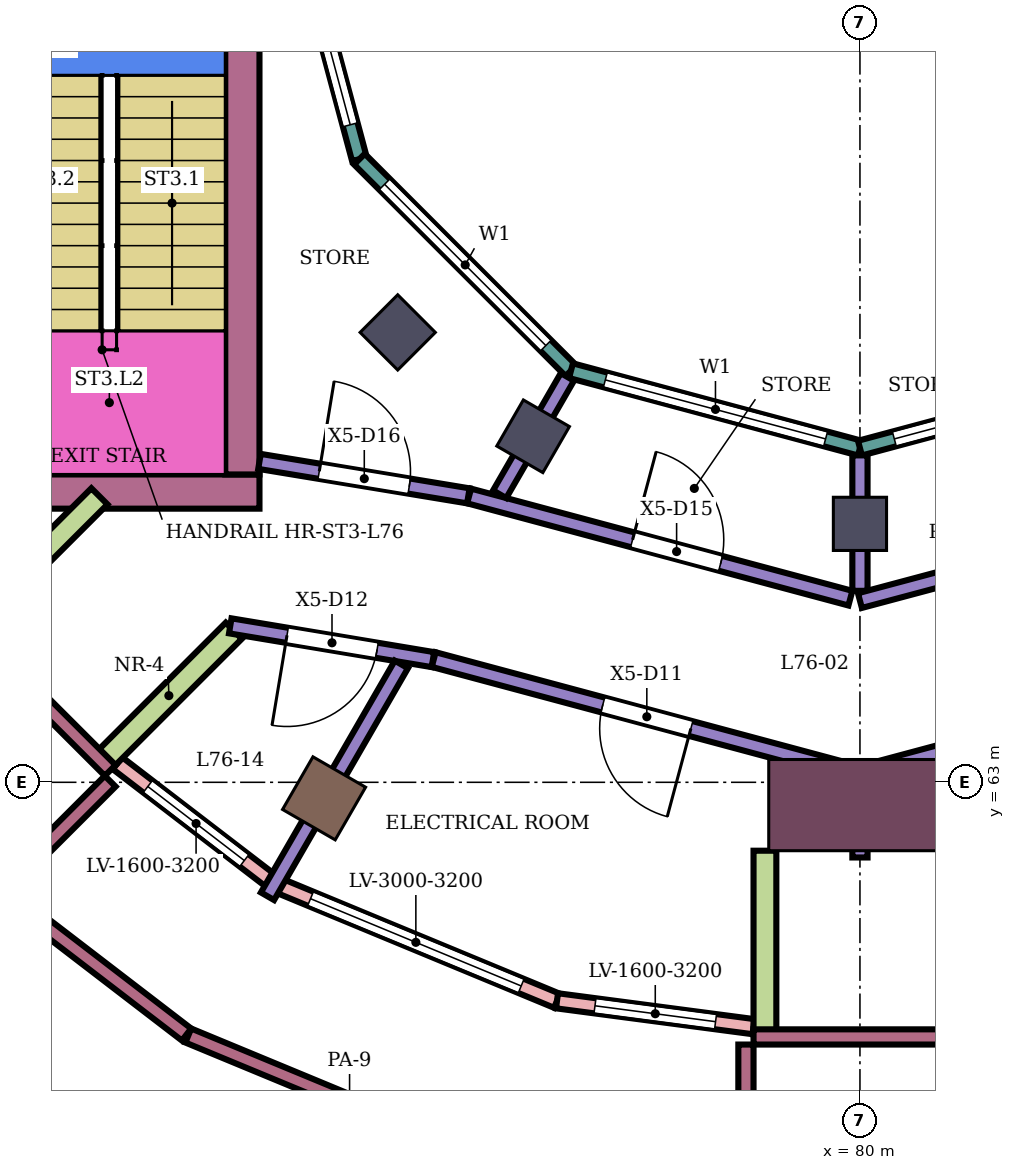
"""IFC4 building model, lengths in metres.
Left out: names, types, materials, properties, quantities, classifications, styles, units other than length and angle.
Written with IfcOpenShell. Run it as: python <this file> out.ifc"""

import sys

from ifc_helpers import new_model, si_unit, direction, frame, frame_2d, origin, origin_2d, place, context, subcontext, project, spatial, rectangle, extrude, element, fill, save


model = new_model("IFC4")
c1 = context("Model", 3, precision=1e-05, world=origin(), true_north=direction((0.0, 1.0)))
c2 = subcontext(c1, "Body", "Model", "MODEL_VIEW")
j1 = project(units=[si_unit("LENGTHUNIT", "METRE"), si_unit("PLANEANGLEUNIT", "RADIAN")], contexts=[c1])
p1 = place(None, origin())
s1 = spatial("IfcSite", under=j1, at=p1, CompositionType="ELEMENT")
p2 = place(p1, origin())
s2 = spatial("IfcBuilding", under=s1, at=p2, CompositionType="ELEMENT")
p3 = place(p2, frame((0.0, 0.0, 333.1)))
s3 = spatial("IfcBuildingStorey", under=s2, at=p3, CompositionType="ELEMENT", Elevation=333.1)
p4 = place(p3, frame((72.95, 62.789, 0.0), z_axis=(0.0, 0.0, 1.0), x_axis=(-0.5, -0.866025403784, 0.0)))
e1 = element("IfcColumn", 1, at=p4, inside=s3, PredefinedType="COLUMN", context=c2, shape_type="SweptSolid", body=[
    extrude(rectangle(XDim=0.8, YDim=0.8, at=origin_2d()), origin(), (0.0, 0.0, 1.0), 4.5),
])
for number, where, z_axis, x_axis in (
    (2, (73.919, 68.919, 0.0), (0.0, 0.0, 1.0), (-0.707, -0.707, 0.0)),
    (3, (75.7, 67.552, 0.0), (0.0, 0.0, 1.0), (-0.5, -0.866, 0.0)),
    (4, (80.0, 66.4, 0.0), (0.0, 0.0, 1.0), (0.0, -1.0, 0.0)),
):
    element("IfcColumn", number, at=place(p3, frame(where, z_axis=z_axis, x_axis=x_axis)), inside=s3, PredefinedType="COLUMN", context=c2, shape_type="SweptSolid", body=[
        extrude(rectangle(XDim=0.7, YDim=0.7, at=origin_2d()), origin(), (0.0, 0.0, 1.0), 4.5),
    ])
p5 = place(p3, frame((80.0, 62.7, 0.0), z_axis=(0.0, 0.0, 1.0), x_axis=(0.0, -1.0, 0.0)))
e5 = element("IfcColumn", 5, at=p5, inside=s3, PredefinedType="COLUMN", context=c2, shape_type="SweptSolid", body=[
    extrude(rectangle(XDim=1.2, YDim=2.4, at=origin_2d()), origin(), (0.0, 0.0, 1.0), 4.5),
])
p6 = place(p3, frame((72.1, 66.825, 0.0), z_axis=(0.0, 0.0, 1.0), x_axis=(-1.0, 0.0, 0.0)))
e6 = element("IfcWall", 6, at=p6, inside=s3, PredefinedType="SHEAR", context=c2, shape_type="SweptSolid", body=[
    extrude(rectangle(XDim=3.8, YDim=0.45, at=frame_2d((1.9, 0.0))), origin(), (0.0, 0.0, 1.0), 4.15),
])
p7 = place(p3, frame((71.875, 75.0, 0.0), z_axis=(0.0, 0.0, 1.0), x_axis=(0.0, -1.0, 0.0)))
e7 = element("IfcWall", 7, at=p7, inside=s3, PredefinedType="SHEAR", context=c2, shape_type="SweptSolid", body=[
    extrude(rectangle(XDim=7.95, YDim=0.45, at=frame_2d((3.975, 0.0))), origin(), (0.0, 0.0, 1.0), 4.15),
])
p8 = place(p3, frame((70.231, 63.251, 0.0), z_axis=(0.0, 0.0, 1.0), x_axis=(0.793402901715, -0.608696833859, 0.0)))
e8 = element("IfcWall", 8, at=p8, inside=s3, PredefinedType="NOTDEFINED", context=c2, shape_type="SweptSolid", body=[
    extrude(rectangle(XDim=2.608, YDim=0.2, at=frame_2d((1.304, 0.0))), origin(), (0.0, 0.0, 1.0), 4.5),
])
p9 = place(p8, frame((0.504, 0.0, 0.5)))
e9 = element("IfcOpeningElement", 9, at=p9, cuts=e8, PredefinedType="OPENING", context=c2, shape_type="SweptSolid", body=[
    extrude(rectangle(XDim=1.6, YDim=3.2, at=frame_2d((0.8, 1.6))), frame((0.0, 0.11, 0.0), z_axis=(0.0, -1.0, 0.0), x_axis=(1.0, 0.0, 0.0)), (0.0, 0.0, 1.0), 0.22),
])
p10 = place(p3, frame((72.301, 61.664, 0.0), z_axis=(0.0, 0.0, 1.0), x_axis=(0.923858417842, -0.38273440371, 0.0)))
e10 = element("IfcWall", 10, at=p10, inside=s3, PredefinedType="NOTDEFINED", context=c2, shape_type="SweptSolid", body=[
    extrude(rectangle(XDim=4.02, YDim=0.2, at=frame_2d((2.01, 0.0))), origin(), (0.0, 0.0, 1.0), 4.5),
])
p11 = place(p10, frame((0.51, 0.0, 0.5)))
e11 = element("IfcOpeningElement", 11, at=p11, cuts=e10, PredefinedType="OPENING", context=c2, shape_type="SweptSolid", body=[
    extrude(rectangle(XDim=3.0, YDim=3.2, at=frame_2d((1.5, 1.6))), frame((0.0, 0.11, 0.0), z_axis=(0.0, -1.0, 0.0), x_axis=(1.0, 0.0, 0.0)), (0.0, 0.0, 1.0), 0.22),
])
p12 = place(p3, frame((76.014, 60.125, 0.0), z_axis=(0.0, 0.0, 1.0), x_axis=(0.991448878041, -0.130495678972, 0.0)))
e12 = element("IfcWall", 12, at=p12, inside=s3, PredefinedType="NOTDEFINED", context=c2, shape_type="SweptSolid", body=[
    extrude(rectangle(XDim=2.608, YDim=0.2, at=frame_2d((1.304, 0.0))), origin(), (0.0, 0.0, 1.0), 4.5),
])
p13 = place(p12, frame((0.504, 0.0, 0.5)))
e13 = element("IfcOpeningElement", 13, at=p13, cuts=e12, PredefinedType="OPENING", context=c2, shape_type="SweptSolid", body=[
    extrude(rectangle(XDim=1.6, YDim=3.2, at=frame_2d((0.8, 1.6))), frame((0.0, 0.11, 0.0), z_axis=(0.0, -1.0, 0.0), x_axis=(1.0, 0.0, 0.0)), (0.0, 0.0, 1.0), 0.22),
])
for number, where, z_axis, x_axis in (
    (14, (69.994, 66.762, 0.0), (0.0, 0.0, 1.0), (-0.707, -0.707, 0.0)),
    (15, (71.762, 64.994, 0.0), (0.0, 0.0, 1.0), (-0.707, -0.707, 0.0)),
    (16, (78.75, 62.1, 0.0), (0.0, 0.0, 1.0), (0.0, -1.0, 0.0)),
):
    element("IfcWall", number, at=place(p3, frame(where, z_axis=z_axis, x_axis=x_axis)), inside=s3, PredefinedType="NOTDEFINED", context=c2, shape_type="SweptSolid", body=[
        extrude(rectangle(XDim=2.416, YDim=0.3, at=frame_2d((1.208, 0.0))), origin(), (0.0, 0.0, 1.0), 4.5),
    ])
p14 = place(p3, frame((72.396, 75.0, 0.0), z_axis=(0.0, 0.0, 1.0), x_axis=(0.258789828301, -0.965933654434, 0.0)))
e17 = element("IfcWall", 17, at=p14, inside=s3, PredefinedType="NOTDEFINED", context=c2, shape_type="SweptSolid", body=[
    extrude(rectangle(XDim=3.936, YDim=0.2, at=frame_2d((1.968, 0.0))), origin(), (0.0, 0.0, 1.0), 4.5),
])
p15 = place(p14, frame((0.468, 0.0, 0.9)))
e18 = element("IfcOpeningElement", 18, at=p15, cuts=e17, PredefinedType="OPENING", context=c2, shape_type="SweptSolid", body=[
    extrude(rectangle(XDim=3.0, YDim=2.3, at=frame_2d((1.5, 1.15))), frame((0.0, 0.11, 0.0), z_axis=(0.0, -1.0, 0.0), x_axis=(1.0, 0.0, 0.0)), (0.0, 0.0, 1.0), 0.22),
])
p16 = place(p3, frame((73.415, 71.198, 0.0), z_axis=(0.0, 0.0, 1.0), x_axis=(0.707106781187, -0.707106781187, 0.0)))
e19 = element("IfcWall", 19, at=p16, inside=s3, PredefinedType="NOTDEFINED", context=c2, shape_type="SweptSolid", body=[
    extrude(rectangle(XDim=3.936, YDim=0.2, at=frame_2d((1.968, 0.0))), origin(), (0.0, 0.0, 1.0), 4.5),
])
p17 = place(p16, frame((0.468, 0.0, 0.9)))
e20 = element("IfcOpeningElement", 20, at=p17, cuts=e19, PredefinedType="OPENING", context=c2, shape_type="SweptSolid", body=[
    extrude(rectangle(XDim=3.0, YDim=2.3, at=frame_2d((1.5, 1.15))), frame((0.0, 0.11, 0.0), z_axis=(0.0, -1.0, 0.0), x_axis=(1.0, 0.0, 0.0)), (0.0, 0.0, 1.0), 0.22),
])
p18 = place(p3, frame((76.198, 68.415, 0.0), z_axis=(0.0, 0.0, 1.0), x_axis=(0.965933654434, -0.258789828301, 0.0)))
e21 = element("IfcWall", 21, at=p18, inside=s3, PredefinedType="NOTDEFINED", context=c2, shape_type="SweptSolid", body=[
    extrude(rectangle(XDim=3.936, YDim=0.2, at=frame_2d((1.968, 0.0))), origin(), (0.0, 0.0, 1.0), 4.5),
])
p19 = place(p18, frame((0.468, 0.0, 0.9)))
e22 = element("IfcOpeningElement", 22, at=p19, cuts=e21, PredefinedType="OPENING", context=c2, shape_type="SweptSolid", body=[
    extrude(rectangle(XDim=3.0, YDim=2.3, at=frame_2d((1.5, 1.15))), frame((0.0, 0.11, 0.0), z_axis=(0.0, -1.0, 0.0), x_axis=(1.0, 0.0, 0.0)), (0.0, 0.0, 1.0), 0.22),
])
p20 = place(p3, frame((80.0, 67.396, 0.0), z_axis=(0.0, 0.0, 1.0), x_axis=(0.965933654434, 0.258789828301, 0.0)))
e23 = element("IfcWall", 23, at=p20, inside=s3, PredefinedType="NOTDEFINED", context=c2, shape_type="SweptSolid", body=[
    extrude(rectangle(XDim=3.936, YDim=0.2, at=frame_2d((1.968, 0.0))), origin(), (0.0, 0.0, 1.0), 4.5),
])
p21 = place(p20, frame((0.468, 0.0, 0.9)))
e24 = element("IfcOpeningElement", 24, at=p21, cuts=e23, PredefinedType="OPENING", context=c2, shape_type="SweptSolid", body=[
    extrude(rectangle(XDim=3.0, YDim=2.3, at=frame_2d((1.5, 1.15))), frame((0.0, 0.11, 0.0), z_axis=(0.0, -1.0, 0.0), x_axis=(1.0, 0.0, 0.0)), (0.0, 0.0, 1.0), 0.22),
])
p22 = place(p3, frame((81.4, 59.65, 0.0), z_axis=(0.0, 0.0, 1.0), x_axis=(-1.0, 0.0, 0.0)))
e25 = element("IfcWall", 25, at=p22, inside=s3, PredefinedType="PARAPET", context=c2, shape_type="SweptSolid", body=[
    extrude(rectangle(XDim=2.8, YDim=0.2, at=frame_2d((1.4, 0.0))), origin(), (0.0, 0.0, 1.0), 1.1),
])
p23 = place(p3, frame((78.5, 59.55, 0.0), z_axis=(0.0, 0.0, 1.0), x_axis=(0.0, -1.0, 0.0)))
e26 = element("IfcWall", 26, at=p23, inside=s3, PredefinedType="PARAPET", context=c2, shape_type="SweptSolid", body=[
    extrude(rectangle(XDim=1.936, YDim=0.2, at=frame_2d((0.968, 0.0))), origin(), (0.0, 0.0, 1.0), 1.1),
])
p24 = place(p3, frame((75.407, 57.911, 0.0), z_axis=(0.0, 0.0, 1.0), x_axis=(-0.923884687805, 0.382670986147, 0.0)))
e27 = element("IfcWall", 27, at=p24, inside=s3, PredefinedType="PARAPET", context=c2, shape_type="SweptSolid", body=[
    extrude(rectangle(XDim=4.594, YDim=0.2, at=frame_2d((2.297, 0.0))), origin(), (0.0, 0.0, 1.0), 1.1),
])
p25 = place(p3, frame((71.141, 59.682, 0.0), z_axis=(0.0, 0.0, 1.0), x_axis=(-0.79335441758, 0.608760025056, 0.0)))
e28 = element("IfcWall", 28, at=p25, inside=s3, PredefinedType="PARAPET", context=c2, shape_type="SweptSolid", body=[
    extrude(rectangle(XDim=2.98, YDim=0.2, at=frame_2d((1.49, 0.0))), origin(), (0.0, 0.0, 1.0), 1.1),
])
p26 = place(p3, frame((68.767, 61.646, 0.0), z_axis=(0.0, 0.0, 1.0), x_axis=(0.707043717037, 0.707169839712, 0.0)))
e29 = element("IfcWall", 29, at=p26, inside=s3, PredefinedType="PARAPET", context=c2, shape_type="SweptSolid", body=[
    extrude(rectangle(XDim=1.936, YDim=0.2, at=frame_2d((0.968, 0.0))), origin(), (0.0, 0.0, 1.0), 1.1),
])
p27 = place(p3, frame((70.136, 63.156, 0.0), z_axis=(0.0, 0.0, 1.0), x_axis=(-0.707106781187, 0.707106781187, 0.0)))
e30 = element("IfcWall", 30, at=p27, inside=s3, PredefinedType="PARAPET", context=c2, shape_type="SweptSolid", body=[
    extrude(rectangle(XDim=2.8, YDim=0.2, at=frame_2d((1.4, 0.0))), origin(), (0.0, 0.0, 1.0), 1.1),
])
p28 = place(p3, frame((71.716, 65.058, 0.0), z_axis=(0.0, 0.0, 1.0), x_axis=(0.986393923832, -0.164398987305, 0.0)))
e31 = element("IfcWall", 31, at=p28, inside=s3, PredefinedType="PARTITIONING", context=c2, shape_type="SweptSolid", body=[
    extrude(rectangle(XDim=2.703, YDim=0.2, at=frame_2d((1.352, 0.0))), origin(), (0.0, 0.0, 1.0), 4.05),
])
p29 = place(p28, frame((0.757, 0.0, 0.0)))
e32 = element("IfcOpeningElement", 32, at=p29, cuts=e31, PredefinedType="OPENING", context=c2, shape_type="SweptSolid", body=[
    extrude(rectangle(XDim=1.2, YDim=2.4, at=frame_2d((0.6, 1.2))), frame((0.0, 0.11, 0.0), z_axis=(0.0, -1.0, 0.0), x_axis=(1.0, 0.0, 0.0)), (0.0, 0.0, 1.0), 0.22),
])
p30 = place(p3, frame((72.1, 67.222, 0.0), z_axis=(0.0, 0.0, 1.0), x_axis=(0.986662669858, -0.162778302943, 0.0)))
e33 = element("IfcWall", 33, at=p30, inside=s3, PredefinedType="PARTITIONING", context=c2, shape_type="SweptSolid", body=[
    extrude(rectangle(XDim=2.785, YDim=0.2, at=frame_2d((1.393, 0.0))), origin(), (0.0, 0.0, 1.0), 4.05),
])
p31 = place(p30, frame((0.798, 0.0, 0.0)))
e34 = element("IfcOpeningElement", 34, at=p31, cuts=e33, PredefinedType="OPENING", context=c2, shape_type="SweptSolid", body=[
    extrude(rectangle(XDim=1.2, YDim=2.4, at=frame_2d((0.6, 1.2))), frame((0.0, 0.11, 0.0), z_axis=(0.0, -1.0, 0.0), x_axis=(1.0, 0.0, 0.0)), (0.0, 0.0, 1.0), 0.22),
])
p32 = place(p3, frame((72.206, 61.501, 0.0), z_axis=(0.0, 0.0, 1.0), x_axis=(0.500038497407, 0.866003176155, 0.0)))
e35 = element("IfcWall", 35, at=p32, inside=s3, PredefinedType="PARTITIONING", context=c2, shape_type="SweptSolid", body=[
    extrude(rectangle(XDim=3.522, YDim=0.2, at=frame_2d((1.761, 0.0))), origin(), (0.0, 0.0, 1.0), 4.05),
])
p33 = place(p3, frame((74.392, 64.615, 0.0), z_axis=(0.0, 0.0, 1.0), x_axis=(0.965852483565, -0.259092608911, 0.0)))
e36 = element("IfcWall", 36, at=p33, inside=s3, PredefinedType="PARTITIONING", context=c2, shape_type="SweptSolid", body=[
    extrude(rectangle(XDim=5.716, YDim=0.2, at=frame_2d((2.858, 0.0))), origin(), (0.0, 0.0, 1.0), 4.05),
])
p34 = place(p33, frame((2.303, 0.0, 0.0)))
e37 = element("IfcOpeningElement", 37, at=p34, cuts=e36, PredefinedType="OPENING", context=c2, shape_type="SweptSolid", body=[
    extrude(rectangle(XDim=1.2, YDim=2.4, at=frame_2d((0.6, 1.2))), frame((0.0, 0.11, 0.0), z_axis=(0.0, -1.0, 0.0), x_axis=(1.0, 0.0, 0.0)), (0.0, 0.0, 1.0), 0.22),
])
p35 = place(p3, frame((74.858, 66.767, 0.0), z_axis=(0.0, 0.0, 1.0), x_axis=(0.965911957735, -0.258870797705, 0.0)))
e38 = element("IfcWall", 38, at=p35, inside=s3, PredefinedType="PARTITIONING", context=c2, shape_type="SweptSolid", body=[
    extrude(rectangle(XDim=5.194, YDim=0.2, at=frame_2d((2.597, 0.0))), origin(), (0.0, 0.0, 1.0), 4.05),
])
p36 = place(p35, frame((2.226, 0.0, 0.0)))
e39 = element("IfcOpeningElement", 39, at=p36, cuts=e38, PredefinedType="OPENING", context=c2, shape_type="SweptSolid", body=[
    extrude(rectangle(XDim=1.2, YDim=2.4, at=frame_2d((0.6, 1.2))), frame((0.0, 0.11, 0.0), z_axis=(0.0, -1.0, 0.0), x_axis=(1.0, 0.0, 0.0)), (0.0, 0.0, 1.0), 0.22),
])
p37 = place(p3, frame((75.26, 66.79, 0.0), z_axis=(0.0, 0.0, 1.0), x_axis=(0.500058459303, 0.865991649659, 0.0)))
e40 = element("IfcWall", 40, at=p37, inside=s3, PredefinedType="PARTITIONING", context=c2, shape_type="SweptSolid", body=[
    extrude(rectangle(XDim=1.782, YDim=0.2, at=frame_2d((0.891, 0.0))), origin(), (0.0, 0.0, 1.0), 4.05),
])
p38 = place(p3, frame((80.0, 62.011, 0.0), z_axis=(0.0, 0.0, 1.0), x_axis=(0.0, 1.0, 0.0)))
e41 = element("IfcWall", 41, at=p38, inside=s3, PredefinedType="PARTITIONING", context=c2, shape_type="SweptSolid", body=[
    extrude(rectangle(XDim=1.009, YDim=0.2, at=frame_2d((0.504, 0.0))), origin(), (0.0, 0.0, 1.0), 4.05),
])
p39 = place(p3, frame((80.0, 63.111, 0.0), z_axis=(0.0, 0.0, 1.0), x_axis=(0.965908374176, 0.258884168492, 0.0)))
e42 = element("IfcWall", 42, at=p39, inside=s3, PredefinedType="PARTITIONING", context=c2, shape_type="SweptSolid", body=[
    extrude(rectangle(XDim=5.796, YDim=0.2, at=frame_2d((2.898, 0.0))), origin(), (0.0, 0.0, 1.0), 4.05),
])
p40 = place(p39, frame((3.832, 0.0, 0.0)))
e43 = element("IfcOpeningElement", 43, at=p40, cuts=e42, PredefinedType="OPENING", context=c2, shape_type="SweptSolid", body=[
    extrude(rectangle(XDim=1.2, YDim=2.4, at=frame_2d((0.6, 1.2))), frame((0.0, 0.11, 0.0), z_axis=(0.0, -1.0, 0.0), x_axis=(1.0, 0.0, 0.0)), (0.0, 0.0, 1.0), 0.22),
])
p41 = place(p39, frame((1.248, 0.0, 0.0)))
e44 = element("IfcOpeningElement", 44, at=p41, cuts=e42, PredefinedType="OPENING", context=c2, shape_type="SweptSolid", body=[
    extrude(rectangle(XDim=1.2, YDim=2.4, at=frame_2d((0.6, 1.2))), frame((0.0, 0.11, 0.0), z_axis=(0.0, -1.0, 0.0), x_axis=(1.0, 0.0, 0.0)), (0.0, 0.0, 1.0), 0.22),
])
p42 = place(p3, frame((80.0, 65.519, 0.0), z_axis=(0.0, 0.0, 1.0), x_axis=(0.0, 1.0, 0.0)))
e45 = element("IfcWall", 45, at=p42, inside=s3, PredefinedType="PARTITIONING", context=c2, shape_type="SweptSolid", body=[
    extrude(rectangle(XDim=1.782, YDim=0.2, at=frame_2d((0.891, 0.0))), origin(), (0.0, 0.0, 1.0), 4.05),
])
p43 = place(p3, frame((80.0, 65.39, 0.0), z_axis=(0.0, 0.0, 1.0), x_axis=(0.966134201203, 0.258040123363, 0.0)))
e46 = element("IfcWall", 46, at=p43, inside=s3, PredefinedType="PARTITIONING", context=c2, shape_type="SweptSolid", body=[
    extrude(rectangle(XDim=5.313, YDim=0.2, at=frame_2d((2.657, 0.0))), origin(), (0.0, 0.0, 1.0), 4.05),
])
p44 = place(p43, frame((1.897, 0.0, 0.0)))
e47 = element("IfcOpeningElement", 47, at=p44, cuts=e46, PredefinedType="OPENING", context=c2, shape_type="SweptSolid", body=[
    extrude(rectangle(XDim=1.2, YDim=2.4, at=frame_2d((0.6, 1.2))), frame((0.0, 0.11, 0.0), z_axis=(0.0, -1.0, 0.0), x_axis=(1.0, 0.0, 0.0)), (0.0, 0.0, 1.0), 0.22),
])
p45 = place(p9, origin())
e48 = element("IfcWindow", 48, at=p45, inside=s3, PartitioningType="SINGLE_PANEL", PredefinedType="USERDEFINED", context=c2, shape_type="SweptSolid", body=[
    extrude(rectangle(XDim=1.6, YDim=3.2, at=frame_2d((0.8, 1.6))), frame((0.0, 0.03, 0.0), z_axis=(0.0, -1.0, 0.0), x_axis=(1.0, 0.0, 0.0)), (0.0, 0.0, 1.0), 0.06),
])
fill(e9, e48)
p46 = place(p11, origin())
e49 = element("IfcWindow", 49, at=p46, inside=s3, PartitioningType="SINGLE_PANEL", PredefinedType="USERDEFINED", context=c2, shape_type="SweptSolid", body=[
    extrude(rectangle(XDim=3.0, YDim=3.2, at=frame_2d((1.5, 1.6))), frame((0.0, 0.03, 0.0), z_axis=(0.0, -1.0, 0.0), x_axis=(1.0, 0.0, 0.0)), (0.0, 0.0, 1.0), 0.06),
])
fill(e11, e49)
p47 = place(p13, origin())
e50 = element("IfcWindow", 50, at=p47, inside=s3, PartitioningType="SINGLE_PANEL", PredefinedType="USERDEFINED", context=c2, shape_type="SweptSolid", body=[
    extrude(rectangle(XDim=1.6, YDim=3.2, at=frame_2d((0.8, 1.6))), frame((0.0, 0.03, 0.0), z_axis=(0.0, -1.0, 0.0), x_axis=(1.0, 0.0, 0.0)), (0.0, 0.0, 1.0), 0.06),
])
fill(e13, e50)
p48 = place(p15, origin())
e51 = element("IfcWindow", 51, at=p48, inside=s3, PartitioningType="SINGLE_PANEL", PredefinedType="WINDOW", context=c2, shape_type="SweptSolid", body=[
    extrude(rectangle(XDim=3.0, YDim=2.3, at=frame_2d((1.5, 1.15))), frame((0.0, 0.03, 0.0), z_axis=(0.0, -1.0, 0.0), x_axis=(1.0, 0.0, 0.0)), (0.0, 0.0, 1.0), 0.06),
])
fill(e18, e51)
p49 = place(p17, origin())
e52 = element("IfcWindow", 52, at=p49, inside=s3, PartitioningType="SINGLE_PANEL", PredefinedType="WINDOW", context=c2, shape_type="SweptSolid", body=[
    extrude(rectangle(XDim=3.0, YDim=2.3, at=frame_2d((1.5, 1.15))), frame((0.0, 0.03, 0.0), z_axis=(0.0, -1.0, 0.0), x_axis=(1.0, 0.0, 0.0)), (0.0, 0.0, 1.0), 0.06),
])
fill(e20, e52)
p50 = place(p19, origin())
e53 = element("IfcWindow", 53, at=p50, inside=s3, PartitioningType="SINGLE_PANEL", PredefinedType="WINDOW", context=c2, shape_type="SweptSolid", body=[
    extrude(rectangle(XDim=3.0, YDim=2.3, at=frame_2d((1.5, 1.15))), frame((0.0, 0.03, 0.0), z_axis=(0.0, -1.0, 0.0), x_axis=(1.0, 0.0, 0.0)), (0.0, 0.0, 1.0), 0.06),
])
fill(e22, e53)
p51 = place(p21, origin())
e54 = element("IfcWindow", 54, at=p51, inside=s3, PartitioningType="SINGLE_PANEL", PredefinedType="WINDOW", context=c2, shape_type="SweptSolid", body=[
    extrude(rectangle(XDim=3.0, YDim=2.3, at=frame_2d((1.5, 1.15))), frame((0.0, 0.03, 0.0), z_axis=(0.0, -1.0, 0.0), x_axis=(1.0, 0.0, 0.0)), (0.0, 0.0, 1.0), 0.06),
])
fill(e24, e54)
p52 = place(p34, frame((1.2, 0.0, 0.0), z_axis=(0.0, 0.0, 1.0), x_axis=(-1.0, 0.0, 0.0)))
e55 = element("IfcDoor", 55, at=p52, inside=s3, OperationType="SINGLE_SWING_LEFT", PredefinedType="DOOR", context=c2, shape_type="SweptSolid", body=[
    extrude(rectangle(XDim=1.2, YDim=2.4, at=frame_2d((0.6, 1.2))), frame((0.0, 0.025, 0.0), z_axis=(0.0, -1.0, 0.0), x_axis=(1.0, 0.0, 0.0)), (0.0, 0.0, 1.0), 0.05),
])
fill(e37, e55)
p53 = place(p29, frame((1.2, 0.0, 0.0), z_axis=(0.0, 0.0, 1.0), x_axis=(-1.0, 0.0, 0.0)))
e56 = element("IfcDoor", 56, at=p53, inside=s3, OperationType="SINGLE_SWING_RIGHT", PredefinedType="DOOR", context=c2, shape_type="SweptSolid", body=[
    extrude(rectangle(XDim=1.2, YDim=2.4, at=frame_2d((0.6, 1.2))), frame((0.0, 0.025, 0.0), z_axis=(0.0, -1.0, 0.0), x_axis=(1.0, 0.0, 0.0)), (0.0, 0.0, 1.0), 0.05),
])
fill(e32, e56)
p54 = place(p36, origin())
e57 = element("IfcDoor", 57, at=p54, inside=s3, OperationType="SINGLE_SWING_LEFT", PredefinedType="DOOR", context=c2, shape_type="SweptSolid", body=[
    extrude(rectangle(XDim=1.2, YDim=2.4, at=frame_2d((0.6, 1.2))), frame((0.0, 0.025, 0.0), z_axis=(0.0, -1.0, 0.0), x_axis=(1.0, 0.0, 0.0)), (0.0, 0.0, 1.0), 0.05),
])
fill(e39, e57)
p55 = place(p31, origin())
e58 = element("IfcDoor", 58, at=p55, inside=s3, OperationType="SINGLE_SWING_LEFT", PredefinedType="DOOR", context=c2, shape_type="SweptSolid", body=[
    extrude(rectangle(XDim=1.2, YDim=2.4, at=frame_2d((0.6, 1.2))), frame((0.0, 0.025, 0.0), z_axis=(0.0, -1.0, 0.0), x_axis=(1.0, 0.0, 0.0)), (0.0, 0.0, 1.0), 0.05),
])
fill(e34, e58)
save(model, sys.argv[1])
